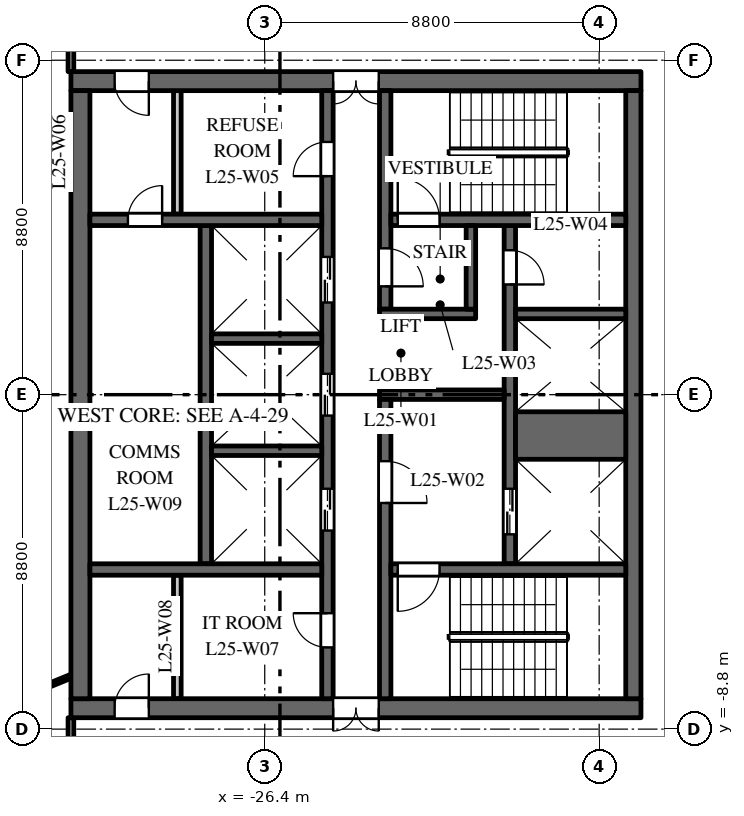
"""IFC4 building model, lengths in metres.
Left out: names, types, materials, properties, quantities, classifications, styles, units other than length and angle.
Written with IfcOpenShell. Run it as: python <this file> out.ifc"""

import sys

from ifc_helpers import new_model, si_unit, direction, frame, frame_2d, origin, place, context, subcontext, project, spatial, rectangle, extrude, element, fill, save


model = new_model("IFC4")
c1 = context("Model", 3, precision=1e-05, world=origin(), true_north=direction((0.0, 1.0)))
c2 = subcontext(c1, "Body", "Model", "MODEL_VIEW")
j1 = project(units=[si_unit("LENGTHUNIT", "METRE"), si_unit("PLANEANGLEUNIT", "RADIAN")], contexts=[c1])
p1 = place(None, origin())
s1 = spatial("IfcSite", under=j1, at=p1, CompositionType="ELEMENT")
p2 = place(p1, origin())
s2 = spatial("IfcBuilding", under=s1, at=p2, CompositionType="ELEMENT")
p3 = place(p2, frame((0.0, 0.0, 112.0)))
s3 = spatial("IfcBuildingStorey", under=s2, at=p3, CompositionType="ELEMENT", Elevation=112.0)
p4 = place(p3, frame((-16.5, 8.25, 0.0), z_axis=(0.0, 0.0, 1.0), x_axis=(-1.0, 0.0, 0.0)))
e1 = element("IfcWall", 1, at=p4, inside=s3, PredefinedType="SHEAR", context=c2, shape_type="SweptSolid", body=[
    extrude(rectangle(XDim=15.0, YDim=0.5, at=frame_2d((7.5, 0.0))), origin(), (0.0, 0.0, 1.0), 3.7),
])
p5 = place(p4, frame((6.9, 0.0, 0.0)))
e2 = element("IfcOpeningElement", 2, at=p5, cuts=e1, PredefinedType="OPENING", context=c2, shape_type="SweptSolid", body=[
    extrude(rectangle(XDim=1.2, YDim=2.1, at=frame_2d((0.6, 1.05))), frame((0.0, 0.26, 0.0), z_axis=(0.0, -1.0, 0.0), x_axis=(1.0, 0.0, 0.0)), (0.0, 0.0, 1.0), 0.52),
])
p6 = place(p4, frame((12.95, 0.0, 0.0)))
e3 = element("IfcOpeningElement", 3, at=p6, cuts=e1, PredefinedType="OPENING", context=c2, shape_type="SweptSolid", body=[
    extrude(rectangle(XDim=0.9, YDim=2.1, at=frame_2d((0.45, 1.05))), frame((0.0, 0.26, 0.0), z_axis=(0.0, -1.0, 0.0), x_axis=(1.0, 0.0, 0.0)), (0.0, 0.0, 1.0), 0.52),
])
p7 = place(p3, frame((-16.5, -8.25, 0.0), z_axis=(0.0, 0.0, 1.0), x_axis=(-1.0, 0.0, 0.0)))
e4 = element("IfcWall", 4, at=p7, inside=s3, PredefinedType="SHEAR", context=c2, shape_type="SweptSolid", body=[
    extrude(rectangle(XDim=15.0, YDim=0.5, at=frame_2d((7.5, 0.0))), origin(), (0.0, 0.0, 1.0), 3.7),
])
p8 = place(p7, frame((6.9, 0.0, 0.0)))
e5 = element("IfcOpeningElement", 5, at=p8, cuts=e4, PredefinedType="OPENING", context=c2, shape_type="SweptSolid", body=[
    extrude(rectangle(XDim=1.2, YDim=2.1, at=frame_2d((0.6, 1.05))), frame((0.0, 0.26, 0.0), z_axis=(0.0, -1.0, 0.0), x_axis=(1.0, 0.0, 0.0)), (0.0, 0.0, 1.0), 0.52),
])
p9 = place(p7, frame((12.95, 0.0, 0.0)))
e6 = element("IfcOpeningElement", 6, at=p9, cuts=e4, PredefinedType="OPENING", context=c2, shape_type="SweptSolid", body=[
    extrude(rectangle(XDim=0.9, YDim=2.1, at=frame_2d((0.45, 1.05))), frame((0.0, 0.26, 0.0), z_axis=(0.0, -1.0, 0.0), x_axis=(1.0, 0.0, 0.0)), (0.0, 0.0, 1.0), 0.52),
])
p10 = place(p3, frame((-27.95, -4.45, 0.0), z_axis=(0.0, 0.0, 1.0), x_axis=(0.0, 1.0, 0.0)))
e7 = element("IfcWall", 7, at=p10, inside=s3, PredefinedType="SHEAR", context=c2, shape_type="SweptSolid", body=[
    extrude(rectangle(XDim=8.9, YDim=0.3, at=frame_2d((4.45, 0.0))), origin(), (0.0, 0.0, 1.0), 3.7),
])
p11 = place(p3, frame((-19.95, -4.45, 0.0), z_axis=(0.0, 0.0, 1.0), x_axis=(0.0, 1.0, 0.0)))
e8 = element("IfcWall", 8, at=p11, inside=s3, PredefinedType="SHEAR", context=c2, shape_type="SweptSolid", body=[
    extrude(rectangle(XDim=8.9, YDim=0.3, at=frame_2d((4.45, 0.0))), origin(), (0.0, 0.0, 1.0), 3.7),
])
p12 = place(p11, frame((0.775, 0.0, 0.0)))
e9 = element("IfcOpeningElement", 9, at=p12, cuts=e8, PredefinedType="OPENING", context=c2, shape_type="SweptSolid", body=[
    extrude(rectangle(XDim=1.2, YDim=2.1, at=frame_2d((0.6, 1.05))), frame((0.0, 0.16, 0.0), z_axis=(0.0, -1.0, 0.0), x_axis=(1.0, 0.0, 0.0)), (0.0, 0.0, 1.0), 0.32),
])
p13 = place(p11, frame((7.35, 0.0, 0.0)))
e10 = element("IfcOpeningElement", 10, at=p13, cuts=e8, PredefinedType="OPENING", context=c2, shape_type="SweptSolid", body=[
    extrude(rectangle(XDim=0.9, YDim=2.1, at=frame_2d((0.45, 1.05))), frame((0.0, 0.16, 0.0), z_axis=(0.0, -1.0, 0.0), x_axis=(1.0, 0.0, 0.0)), (0.0, 0.0, 1.0), 0.32),
])
p14 = place(p3, frame((-24.75, -8.0, 0.0), z_axis=(0.0, 0.0, 1.0), x_axis=(0.0, 1.0, 0.0)))
e11 = element("IfcWall", 11, at=p14, inside=s3, PredefinedType="SHEAR", context=c2, shape_type="SweptSolid", body=[
    extrude(rectangle(XDim=16.0, YDim=0.3, at=frame_2d((8.0, 0.0))), origin(), (0.0, 0.0, 1.0), 3.7),
])
p15 = place(p14, frame((4.425, 0.0, 0.0)))
e12 = element("IfcOpeningElement", 12, at=p15, cuts=e11, PredefinedType="OPENING", context=c2, shape_type="SweptSolid", body=[
    extrude(rectangle(XDim=1.1, YDim=2.1, at=frame_2d((0.55, 1.05))), frame((0.0, 0.16, 0.0), z_axis=(0.0, -1.0, 0.0), x_axis=(1.0, 0.0, 0.0)), (0.0, 0.0, 1.0), 0.32),
])
p16 = place(p14, frame((7.45, 0.0, 0.0)))
e13 = element("IfcOpeningElement", 13, at=p16, cuts=e11, PredefinedType="OPENING", context=c2, shape_type="SweptSolid", body=[
    extrude(rectangle(XDim=1.1, YDim=2.1, at=frame_2d((0.55, 1.05))), frame((0.0, 0.16, 0.0), z_axis=(0.0, -1.0, 0.0), x_axis=(1.0, 0.0, 0.0)), (0.0, 0.0, 1.0), 0.32),
])
p17 = place(p14, frame((10.425, 0.0, 0.0)))
e14 = element("IfcOpeningElement", 14, at=p17, cuts=e11, PredefinedType="OPENING", context=c2, shape_type="SweptSolid", body=[
    extrude(rectangle(XDim=1.2, YDim=2.1, at=frame_2d((0.6, 1.05))), frame((0.0, 0.16, 0.0), z_axis=(0.0, -1.0, 0.0), x_axis=(1.0, 0.0, 0.0)), (0.0, 0.0, 1.0), 0.32),
])
p18 = place(p14, frame((13.75, 0.0, 0.0)))
e15 = element("IfcOpeningElement", 15, at=p18, cuts=e11, PredefinedType="OPENING", context=c2, shape_type="SweptSolid", body=[
    extrude(rectangle(XDim=0.9, YDim=2.1, at=frame_2d((0.45, 1.05))), frame((0.0, 0.16, 0.0), z_axis=(0.0, -1.0, 0.0), x_axis=(1.0, 0.0, 0.0)), (0.0, 0.0, 1.0), 0.32),
])
p19 = place(p14, frame((1.35, 0.0, 0.0)))
e16 = element("IfcOpeningElement", 16, at=p19, cuts=e11, PredefinedType="OPENING", context=c2, shape_type="SweptSolid", body=[
    extrude(rectangle(XDim=0.9, YDim=2.1, at=frame_2d((0.45, 1.05))), frame((0.0, 0.16, 0.0), z_axis=(0.0, -1.0, 0.0), x_axis=(1.0, 0.0, 0.0)), (0.0, 0.0, 1.0), 0.32),
])
p20 = place(p3, frame((-20.1, 0.0, 0.0), z_axis=(0.0, 0.0, 1.0), x_axis=(-1.0, 0.0, 0.0)))
e17 = element("IfcWall", 17, at=p20, inside=s3, PredefinedType="SHEAR", context=c2, shape_type="SweptSolid", body=[
    extrude(rectangle(XDim=3.28, YDim=0.25, at=frame_2d((1.64, 0.0))), origin(), (0.0, 0.0, 1.0), 3.7),
])
p21 = place(p3, frame((-16.7, -8.0, 0.0), z_axis=(0.0, 0.0, 1.0), x_axis=(0.0, 1.0, 0.0)))
e18 = element("IfcWall", 18, at=p21, inside=s3, PredefinedType="SHEAR", context=c2, shape_type="SweptSolid", body=[
    extrude(rectangle(XDim=16.0, YDim=0.4, at=frame_2d((8.0, 0.0))), origin(), (0.0, 0.0, 1.0), 3.7),
])
p22 = place(p3, frame((-31.25, -8.0, 0.0), z_axis=(0.0, 0.0, 1.0), x_axis=(0.0, 1.0, 0.0)))
e19 = element("IfcWall", 19, at=p22, inside=s3, PredefinedType="SHEAR", context=c2, shape_type="SweptSolid", body=[
    extrude(rectangle(XDim=16.0, YDim=0.5, at=frame_2d((8.0, 0.0))), origin(), (0.0, 0.0, 1.0), 3.7),
])
p23 = place(p3, frame((-24.9, 4.6, 0.0), z_axis=(0.0, 0.0, 1.0), x_axis=(-1.0, 0.0, 0.0)))
e20 = element("IfcWall", 20, at=p23, inside=s3, PredefinedType="SHEAR", context=c2, shape_type="SweptSolid", body=[
    extrude(rectangle(XDim=6.1, YDim=0.3, at=frame_2d((3.05, 0.0))), origin(), (0.0, 0.0, 1.0), 3.7),
])
p24 = place(p23, frame((4.2, 0.0, 0.0)))
e21 = element("IfcOpeningElement", 21, at=p24, cuts=e20, PredefinedType="OPENING", context=c2, shape_type="SweptSolid", body=[
    extrude(rectangle(XDim=0.9, YDim=2.1, at=frame_2d((0.45, 1.05))), frame((0.0, 0.16, 0.0), z_axis=(0.0, -1.0, 0.0), x_axis=(1.0, 0.0, 0.0)), (0.0, 0.0, 1.0), 0.32),
])
for number, where, z_axis, x_axis in (
    (22, (-28.7, 4.75, 0.0), (0.0, 0.0, 1.0), (0.0, 1.0, 0.0)),
    (23, (-28.7, -8.0, 0.0), (0.0, 0.0, 1.0), (0.0, 1.0, 0.0)),
):
    element("IfcWall", number, at=place(p3, frame(where, z_axis=z_axis, x_axis=x_axis)), inside=s3, PredefinedType="PARTITIONING", context=c2, shape_type="SweptSolid", body=[
        extrude(rectangle(XDim=3.25, YDim=0.2, at=frame_2d((1.625, 0.0))), origin(), (0.0, 0.0, 1.0), 3.7),
    ])
p25 = place(p3, frame((-24.9, -4.6, 0.0), z_axis=(0.0, 0.0, 1.0), x_axis=(-1.0, 0.0, 0.0)))
e24 = element("IfcWall", 24, at=p25, inside=s3, PredefinedType="SHEAR", context=c2, shape_type="SweptSolid", body=[
    extrude(rectangle(XDim=6.1, YDim=0.3, at=frame_2d((3.05, 0.0))), origin(), (0.0, 0.0, 1.0), 3.7),
])
p26 = place(p3, frame((-16.9, -1.075, 0.0), z_axis=(0.0, 0.0, 1.0), x_axis=(-1.0, 0.0, 0.0)))
e25 = element("IfcWall", 25, at=p26, inside=s3, PredefinedType="SHEAR", context=c2, shape_type="SweptSolid", body=[
    extrude(rectangle(XDim=2.9, YDim=1.25, at=frame_2d((1.45, 0.0))), origin(), (0.0, 0.0, 1.0), 3.7),
])
for number, where, z_axis, x_axis in (
    (26, (-16.9, 2.125, 0.0), (0.0, 0.0, 1.0), (-1.0, 0.0, 0.0)),
    (27, (-24.9, -1.475, 0.0), (0.0, 0.0, 1.0), (-1.0, 0.0, 0.0)),
    (28, (-24.9, 1.475, 0.0), (0.0, 0.0, 1.0), (-1.0, 0.0, 0.0)),
):
    element("IfcWall", number, at=place(p3, frame(where, z_axis=z_axis, x_axis=x_axis)), inside=s3, PredefinedType="SHEAR", context=c2, shape_type="SweptSolid", body=[
        extrude(rectangle(XDim=2.9, YDim=0.25, at=frame_2d((1.45, 0.0))), origin(), (0.0, 0.0, 1.0), 3.7),
    ])
p27 = place(p3, frame((-23.23, 2.25, 0.0), z_axis=(0.0, 0.0, 1.0), x_axis=(0.0, 1.0, 0.0)))
e29 = element("IfcWall", 29, at=p27, inside=s3, PredefinedType="SHEAR", context=c2, shape_type="SweptSolid", body=[
    extrude(rectangle(XDim=5.75, YDim=0.3, at=frame_2d((2.875, 0.0))), origin(), (0.0, 0.0, 1.0), 3.7),
])
p28 = place(p27, frame((0.6, 0.0, 0.0)))
e30 = element("IfcOpeningElement", 30, at=p28, cuts=e29, PredefinedType="OPENING", context=c2, shape_type="SweptSolid", body=[
    extrude(rectangle(XDim=1.0, YDim=2.1, at=frame_2d((0.5, 1.05))), frame((0.0, 0.16, 0.0), z_axis=(0.0, -1.0, 0.0), x_axis=(1.0, 0.0, 0.0)), (0.0, 0.0, 1.0), 0.32),
])
p29 = place(p3, frame((-23.23, -8.0, 0.0), z_axis=(0.0, 0.0, 1.0), x_axis=(0.0, 1.0, 0.0)))
e31 = element("IfcWall", 31, at=p29, inside=s3, PredefinedType="SHEAR", context=c2, shape_type="SweptSolid", body=[
    extrude(rectangle(XDim=7.875, YDim=0.3, at=frame_2d((3.938, 0.0))), origin(), (0.0, 0.0, 1.0), 3.7),
])
p30 = place(p29, frame((5.15, 0.0, 0.0)))
e32 = element("IfcOpeningElement", 32, at=p30, cuts=e31, PredefinedType="OPENING", context=c2, shape_type="SweptSolid", body=[
    extrude(rectangle(XDim=1.1, YDim=2.1, at=frame_2d((0.55, 1.05))), frame((0.0, 0.16, 0.0), z_axis=(0.0, -1.0, 0.0), x_axis=(1.0, 0.0, 0.0)), (0.0, 0.0, 1.0), 0.32),
])
p31 = place(p3, frame((-16.9, 4.6, 0.0), z_axis=(0.0, 0.0, 1.0), x_axis=(-1.0, 0.0, 0.0)))
e33 = element("IfcWall", 33, at=p31, inside=s3, PredefinedType="SHEAR", context=c2, shape_type="SweptSolid", body=[
    extrude(rectangle(XDim=6.18, YDim=0.3, at=frame_2d((3.09, 0.0))), origin(), (0.0, 0.0, 1.0), 3.7),
])
p32 = place(p31, frame((4.9, 0.0, 0.0)))
e34 = element("IfcOpeningElement", 34, at=p32, cuts=e33, PredefinedType="OPENING", context=c2, shape_type="SweptSolid", body=[
    extrude(rectangle(XDim=1.1, YDim=2.1, at=frame_2d((0.55, 1.05))), frame((0.0, 0.16, 0.0), z_axis=(0.0, -1.0, 0.0), x_axis=(1.0, 0.0, 0.0)), (0.0, 0.0, 1.0), 0.32),
])
p33 = place(p3, frame((-16.9, -4.6, 0.0), z_axis=(0.0, 0.0, 1.0), x_axis=(-1.0, 0.0, 0.0)))
e35 = element("IfcWall", 35, at=p33, inside=s3, PredefinedType="SHEAR", context=c2, shape_type="SweptSolid", body=[
    extrude(rectangle(XDim=6.18, YDim=0.3, at=frame_2d((3.09, 0.0))), origin(), (0.0, 0.0, 1.0), 3.7),
])
p34 = place(p33, frame((4.9, 0.0, 0.0)))
e36 = element("IfcOpeningElement", 36, at=p34, cuts=e35, PredefinedType="OPENING", context=c2, shape_type="SweptSolid", body=[
    extrude(rectangle(XDim=1.1, YDim=2.1, at=frame_2d((0.55, 1.05))), frame((0.0, 0.16, 0.0), z_axis=(0.0, -1.0, 0.0), x_axis=(1.0, 0.0, 0.0)), (0.0, 0.0, 1.0), 0.32),
])
p35 = place(p3, frame((-20.85, 2.125, 0.0), z_axis=(0.0, 0.0, 1.0), x_axis=(-1.0, 0.0, 0.0)))
e37 = element("IfcWall", 37, at=p35, inside=s3, PredefinedType="SHEAR", context=c2, shape_type="SweptSolid", body=[
    extrude(rectangle(XDim=2.53, YDim=0.25, at=frame_2d((1.265, 0.0))), origin(), (0.0, 0.0, 1.0), 3.7),
])
p36 = place(p3, frame((-20.975, 2.25, 0.0), z_axis=(0.0, 0.0, 1.0), x_axis=(0.0, 1.0, 0.0)))
e38 = element("IfcWall", 38, at=p36, inside=s3, PredefinedType="SHEAR", context=c2, shape_type="SweptSolid", body=[
    extrude(rectangle(XDim=2.2, YDim=0.25, at=frame_2d((1.1, 0.0))), origin(), (0.0, 0.0, 1.0), 3.7),
])
p37 = place(p3, frame((-34.234, -8.53, 0.0), z_axis=(0.0, 0.0, 1.0), x_axis=(0.925344112436, 0.379128307542, 0.0)))
e39 = element("IfcWall", 39, at=p37, inside=s3, PredefinedType="PARTITIONING", context=c2, shape_type="SweptSolid", body=[
    extrude(rectangle(XDim=2.954, YDim=0.1, at=frame_2d((1.477, 0.0))), origin(), (0.0, 0.0, 1.0), 2.9),
])
for number, where, z_axis, x_axis in (
    (40, (-31.5, -10.7, 0.0), (0.0, 0.0, 1.0), (0.0, 1.0, 0.0)),
    (41, (-31.5, 8.5, 0.0), (0.0, 0.0, 1.0), (0.0, 1.0, 0.0)),
):
    element("IfcWall", number, at=place(p3, frame(where, z_axis=z_axis, x_axis=x_axis)), inside=s3, PredefinedType="PARTITIONING", context=c2, shape_type="SweptSolid", body=[
        extrude(rectangle(XDim=2.2, YDim=0.15, at=frame_2d((1.1, 0.0))), origin(), (0.0, 0.0, 1.0), 3.7),
    ])
p38 = place(p12, origin())
e42 = element("IfcDoor", 42, at=p38, inside=s3, OperationType="DOUBLE_DOOR_SLIDING", PredefinedType="DOOR", context=c2, shape_type="SweptSolid", body=[
    extrude(rectangle(XDim=1.2, YDim=2.1, at=frame_2d((0.6, 1.05))), frame((0.0, 0.025, 0.0), z_axis=(0.0, -1.0, 0.0), x_axis=(1.0, 0.0, 0.0)), (0.0, 0.0, 1.0), 0.05),
])
fill(e9, e42)
p39 = place(p15, origin())
e43 = element("IfcDoor", 43, at=p39, inside=s3, OperationType="DOUBLE_DOOR_SLIDING", PredefinedType="DOOR", context=c2, shape_type="SweptSolid", body=[
    extrude(rectangle(XDim=1.1, YDim=2.1, at=frame_2d((0.55, 1.05))), frame((0.0, 0.025, 0.0), z_axis=(0.0, -1.0, 0.0), x_axis=(1.0, 0.0, 0.0)), (0.0, 0.0, 1.0), 0.05),
])
fill(e12, e43)
p40 = place(p16, origin())
e44 = element("IfcDoor", 44, at=p40, inside=s3, OperationType="DOUBLE_DOOR_SLIDING", PredefinedType="DOOR", context=c2, shape_type="SweptSolid", body=[
    extrude(rectangle(XDim=1.1, YDim=2.1, at=frame_2d((0.55, 1.05))), frame((0.0, 0.025, 0.0), z_axis=(0.0, -1.0, 0.0), x_axis=(1.0, 0.0, 0.0)), (0.0, 0.0, 1.0), 0.05),
])
fill(e13, e44)
p41 = place(p17, origin())
e45 = element("IfcDoor", 45, at=p41, inside=s3, OperationType="DOUBLE_DOOR_SLIDING", PredefinedType="DOOR", context=c2, shape_type="SweptSolid", body=[
    extrude(rectangle(XDim=1.2, YDim=2.1, at=frame_2d((0.6, 1.05))), frame((0.0, 0.025, 0.0), z_axis=(0.0, -1.0, 0.0), x_axis=(1.0, 0.0, 0.0)), (0.0, 0.0, 1.0), 0.05),
])
fill(e14, e45)
p42 = place(p32, origin())
e46 = element("IfcDoor", 46, at=p42, inside=s3, OperationType="SINGLE_SWING_RIGHT", PredefinedType="DOOR", context=c2, shape_type="SweptSolid", body=[
    extrude(rectangle(XDim=1.1, YDim=2.1, at=frame_2d((0.55, 1.05))), frame((0.0, 0.025, 0.0), z_axis=(0.0, -1.0, 0.0), x_axis=(1.0, 0.0, 0.0)), (0.0, 0.0, 1.0), 0.05),
])
fill(e34, e46)
p43 = place(p34, origin())
e47 = element("IfcDoor", 47, at=p43, inside=s3, OperationType="SINGLE_SWING_LEFT", PredefinedType="DOOR", context=c2, shape_type="SweptSolid", body=[
    extrude(rectangle(XDim=1.1, YDim=2.1, at=frame_2d((0.55, 1.05))), frame((0.0, 0.025, 0.0), z_axis=(0.0, -1.0, 0.0), x_axis=(1.0, 0.0, 0.0)), (0.0, 0.0, 1.0), 0.05),
])
fill(e36, e47)
p44 = place(p30, origin())
e48 = element("IfcDoor", 48, at=p44, inside=s3, OperationType="SINGLE_SWING_LEFT", PredefinedType="DOOR", context=c2, shape_type="SweptSolid", body=[
    extrude(rectangle(XDim=1.1, YDim=2.1, at=frame_2d((0.55, 1.05))), frame((0.0, 0.025, 0.0), z_axis=(0.0, -1.0, 0.0), x_axis=(1.0, 0.0, 0.0)), (0.0, 0.0, 1.0), 0.05),
])
fill(e32, e48)
p45 = place(p28, origin())
e49 = element("IfcDoor", 49, at=p45, inside=s3, OperationType="SINGLE_SWING_LEFT", PredefinedType="DOOR", context=c2, shape_type="SweptSolid", body=[
    extrude(rectangle(XDim=1.0, YDim=2.1, at=frame_2d((0.5, 1.05))), frame((0.0, 0.025, 0.0), z_axis=(0.0, -1.0, 0.0), x_axis=(1.0, 0.0, 0.0)), (0.0, 0.0, 1.0), 0.05),
])
fill(e30, e49)
p46 = place(p5, origin())
e50 = element("IfcDoor", 50, at=p46, inside=s3, OperationType="DOUBLE_DOOR_DOUBLE_SWING", PredefinedType="DOOR", context=c2, shape_type="SweptSolid", body=[
    extrude(rectangle(XDim=1.2, YDim=2.1, at=frame_2d((0.6, 1.05))), frame((0.0, 0.025, 0.0), z_axis=(0.0, -1.0, 0.0), x_axis=(1.0, 0.0, 0.0)), (0.0, 0.0, 1.0), 0.05),
])
fill(e2, e50)
p47 = place(p8, origin())
e51 = element("IfcDoor", 51, at=p47, inside=s3, OperationType="DOUBLE_DOOR_DOUBLE_SWING", PredefinedType="DOOR", context=c2, shape_type="SweptSolid", body=[
    extrude(rectangle(XDim=1.2, YDim=2.1, at=frame_2d((0.6, 1.05))), frame((0.0, 0.025, 0.0), z_axis=(0.0, -1.0, 0.0), x_axis=(1.0, 0.0, 0.0)), (0.0, 0.0, 1.0), 0.05),
])
fill(e5, e51)
p48 = place(p13, origin())
e52 = element("IfcDoor", 52, at=p48, inside=s3, OperationType="SINGLE_SWING_LEFT", PredefinedType="DOOR", context=c2, shape_type="SweptSolid", body=[
    extrude(rectangle(XDim=0.9, YDim=2.1, at=frame_2d((0.45, 1.05))), frame((0.0, 0.025, 0.0), z_axis=(0.0, -1.0, 0.0), x_axis=(1.0, 0.0, 0.0)), (0.0, 0.0, 1.0), 0.05),
])
fill(e10, e52)
p49 = place(p18, origin())
e53 = element("IfcDoor", 53, at=p49, inside=s3, OperationType="SINGLE_SWING_RIGHT", PredefinedType="DOOR", context=c2, shape_type="SweptSolid", body=[
    extrude(rectangle(XDim=0.9, YDim=2.1, at=frame_2d((0.45, 1.05))), frame((0.0, 0.025, 0.0), z_axis=(0.0, -1.0, 0.0), x_axis=(1.0, 0.0, 0.0)), (0.0, 0.0, 1.0), 0.05),
])
fill(e15, e53)
p50 = place(p6, origin())
e54 = element("IfcDoor", 54, at=p50, inside=s3, OperationType="SINGLE_SWING_RIGHT", PredefinedType="DOOR", context=c2, shape_type="SweptSolid", body=[
    extrude(rectangle(XDim=0.9, YDim=2.1, at=frame_2d((0.45, 1.05))), frame((0.0, 0.025, 0.0), z_axis=(0.0, -1.0, 0.0), x_axis=(1.0, 0.0, 0.0)), (0.0, 0.0, 1.0), 0.05),
])
fill(e3, e54)
p51 = place(p19, origin())
e55 = element("IfcDoor", 55, at=p51, inside=s3, OperationType="SINGLE_SWING_LEFT", PredefinedType="DOOR", context=c2, shape_type="SweptSolid", body=[
    extrude(rectangle(XDim=0.9, YDim=2.1, at=frame_2d((0.45, 1.05))), frame((0.0, 0.025, 0.0), z_axis=(0.0, -1.0, 0.0), x_axis=(1.0, 0.0, 0.0)), (0.0, 0.0, 1.0), 0.05),
])
fill(e16, e55)
p52 = place(p9, origin())
e56 = element("IfcDoor", 56, at=p52, inside=s3, OperationType="SINGLE_SWING_LEFT", PredefinedType="DOOR", context=c2, shape_type="SweptSolid", body=[
    extrude(rectangle(XDim=0.9, YDim=2.1, at=frame_2d((0.45, 1.05))), frame((0.0, 0.025, 0.0), z_axis=(0.0, -1.0, 0.0), x_axis=(1.0, 0.0, 0.0)), (0.0, 0.0, 1.0), 0.05),
])
fill(e6, e56)
p53 = place(p24, origin())
e57 = element("IfcDoor", 57, at=p53, inside=s3, OperationType="SINGLE_SWING_LEFT", PredefinedType="DOOR", context=c2, shape_type="SweptSolid", body=[
    extrude(rectangle(XDim=0.9, YDim=2.1, at=frame_2d((0.45, 1.05))), frame((0.0, 0.025, 0.0), z_axis=(0.0, -1.0, 0.0), x_axis=(1.0, 0.0, 0.0)), (0.0, 0.0, 1.0), 0.05),
])
fill(e21, e57)
save(model, sys.argv[1])
